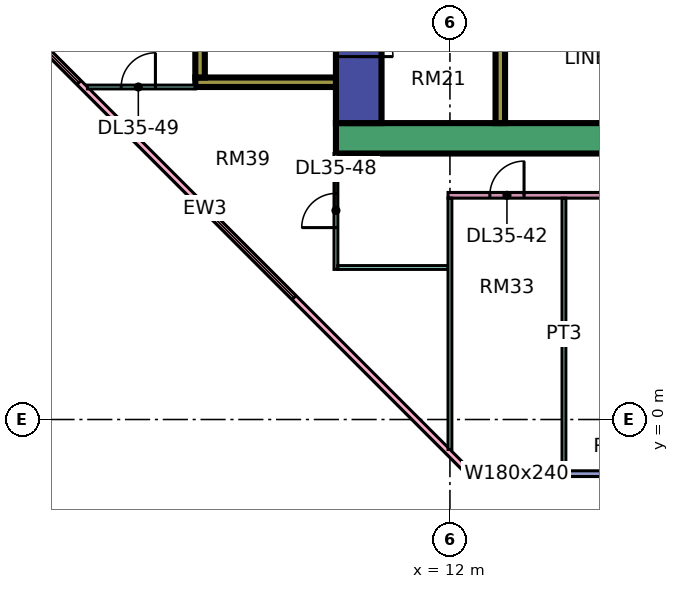
"""IFC4 building model, lengths in metres.
Left out: names, types, materials, properties, quantities, classifications, styles, units other than length and angle.
Written with IfcOpenShell. Run it as: python <this file> out.ifc"""

import sys

from ifc_helpers import new_model, si_unit, direction, frame, frame_2d, origin, place, context, subcontext, project, spatial, rectangle, extrude, element, fill, save


model = new_model("IFC4")
c1 = context("Model", 3, precision=1e-05, world=origin(), true_north=direction((0.0, 1.0)))
c2 = subcontext(c1, "Body", "Model", "MODEL_VIEW")
j1 = project(units=[si_unit("LENGTHUNIT", "METRE"), si_unit("PLANEANGLEUNIT", "RADIAN")], contexts=[c1])
p1 = place(None, origin())
s1 = spatial("IfcSite", under=j1, at=p1, CompositionType="ELEMENT")
p2 = place(p1, origin())
s2 = spatial("IfcBuilding", under=s1, at=p2, CompositionType="ELEMENT")
p3 = place(p2, frame((0.0, 0.0, 157.4)))
s3 = spatial("IfcBuildingStorey", under=s2, at=p3, CompositionType="ELEMENT", Elevation=157.4)
p4 = place(p3, frame((9.0, 7.4, 0.0), z_axis=(0.0, 0.0, 1.0), x_axis=(1.0, 0.0, 0.0)))
e1 = element("IfcWall", 1, at=p4, inside=s3, PredefinedType="SHEAR", context=c2, shape_type="SweptSolid", body=[
    extrude(rectangle(XDim=25.0, YDim=0.8, at=frame_2d((12.5, 0.0))), origin(), (0.0, 0.0, 1.0), 3.75),
])
p5 = place(p3, frame((9.6, 7.8, 0.0), z_axis=(0.0, 0.0, 1.0), x_axis=(0.0, 1.0, 0.0)))
e2 = element("IfcWall", 2, at=p5, inside=s3, PredefinedType="SHEAR", context=c2, shape_type="SweptSolid", body=[
    extrude(rectangle(XDim=11.4, YDim=1.2, at=frame_2d((5.7, 0.0))), origin(), (0.0, 0.0, 1.0), 3.75),
])
p6 = place(p5, frame((4.075, 0.0, 0.0)))
e3 = element("IfcOpeningElement", 3, at=p6, cuts=e2, PredefinedType="OPENING", context=c2, shape_type="SweptSolid", body=[
    extrude(rectangle(XDim=1.1, YDim=2.2, at=frame_2d((0.55, 1.1))), frame((0.0, 0.61, 0.0), z_axis=(0.0, -1.0, 0.0), x_axis=(1.0, 0.0, 0.0)), (0.0, 0.0, 1.0), 1.22),
])
p7 = place(p5, frame((6.575, 0.0, 0.0)))
e4 = element("IfcOpeningElement", 4, at=p7, cuts=e2, PredefinedType="OPENING", context=c2, shape_type="SweptSolid", body=[
    extrude(rectangle(XDim=1.1, YDim=2.2, at=frame_2d((0.55, 1.1))), frame((0.0, 0.61, 0.0), z_axis=(0.0, -1.0, 0.0), x_axis=(1.0, 0.0, 0.0)), (0.0, 0.0, 1.0), 1.22),
])
p8 = place(p5, frame((9.4, 0.0, 0.0)))
e5 = element("IfcOpeningElement", 5, at=p8, cuts=e2, PredefinedType="OPENING", context=c2, shape_type="SweptSolid", body=[
    extrude(rectangle(XDim=1.1, YDim=2.2, at=frame_2d((0.55, 1.1))), frame((0.0, 0.61, 0.0), z_axis=(0.0, -1.0, 0.0), x_axis=(1.0, 0.0, 0.0)), (0.0, 0.0, 1.0), 1.22),
])
p9 = place(p5, frame((1.75, 0.0, 0.0)))
e6 = element("IfcOpeningElement", 6, at=p9, cuts=e2, PredefinedType="OPENING", context=c2, shape_type="SweptSolid", body=[
    extrude(rectangle(XDim=0.9, YDim=2.1, at=frame_2d((0.45, 1.05))), frame((0.0, 0.61, 0.0), z_axis=(0.0, -1.0, 0.0), x_axis=(1.0, 0.0, 0.0)), (0.0, 0.0, 1.0), 1.22),
])
p10 = place(p3, frame((13.325, 7.8, 0.0), z_axis=(0.0, 0.0, 1.0), x_axis=(0.0, 1.0, 0.0)))
e7 = element("IfcWall", 7, at=p10, inside=s3, PredefinedType="SHEAR", context=c2, shape_type="SweptSolid", body=[
    extrude(rectangle(XDim=11.4, YDim=0.25, at=frame_2d((5.7, 0.0))), origin(), (0.0, 0.0, 1.0), 3.75),
])
p11 = place(p3, frame((5.3, 8.875, 0.0), z_axis=(0.0, 0.0, 1.0), x_axis=(1.0, 0.0, 0.0)))
e8 = element("IfcWall", 8, at=p11, inside=s3, PredefinedType="SHEAR", context=c2, shape_type="SweptSolid", body=[
    extrude(rectangle(XDim=3.7, YDim=0.25, at=frame_2d((1.85, 0.0))), origin(), (0.0, 0.0, 1.0), 3.75),
])
p12 = place(p3, frame((5.425, 9.0, 0.0), z_axis=(0.0, 0.0, 1.0), x_axis=(0.0, 1.0, 0.0)))
e9 = element("IfcWall", 9, at=p12, inside=s3, PredefinedType="SHEAR", context=c2, shape_type="SweptSolid", body=[
    extrude(rectangle(XDim=4.0, YDim=0.25, at=frame_2d((2.0, 0.0))), origin(), (0.0, 0.0, 1.0), 3.75),
])
p13 = place(p3, frame((-1.447, 12.553, 0.0), z_axis=(0.0, 0.0, 1.0), x_axis=(0.707106781187, -0.707106781187, 0.0)))
e10 = element("IfcWall", 10, at=p13, inside=s3, PredefinedType="SOLIDWALL", context=c2, shape_type="SweptSolid", body=[
    extrude(rectangle(XDim=19.799, YDim=0.15, at=frame_2d((9.899, 0.0))), origin(), (0.0, 0.0, 1.0), 3.35),
])
p14 = place(p13, frame((2.212, 0.0, 0.45)))
e11 = element("IfcOpeningElement", 11, at=p14, cuts=e10, PredefinedType="OPENING", context=c2, shape_type="SweptSolid", body=[
    extrude(rectangle(XDim=3.0, YDim=2.4, at=frame_2d((1.5, 1.2))), frame((0.0, 0.085, 0.0), z_axis=(0.0, -1.0, 0.0), x_axis=(1.0, 0.0, 0.0)), (0.0, 0.0, 1.0), 0.17),
])
p15 = place(p13, frame((10.216, 0.0, 0.45)))
e12 = element("IfcOpeningElement", 12, at=p15, cuts=e10, PredefinedType="OPENING", context=c2, shape_type="SweptSolid", body=[
    extrude(rectangle(XDim=3.0, YDim=2.4, at=frame_2d((1.5, 1.2))), frame((0.0, 0.085, 0.0), z_axis=(0.0, -1.0, 0.0), x_axis=(1.0, 0.0, 0.0)), (0.0, 0.0, 1.0), 0.17),
])
p16 = place(p3, frame((12.5, -1.425, 0.0), z_axis=(0.0, 0.0, 1.0), x_axis=(1.0, 0.0, 0.0)))
e13 = element("IfcWall", 13, at=p16, inside=s3, PredefinedType="SOLIDWALL", context=c2, shape_type="SweptSolid", body=[
    extrude(rectangle(XDim=11.425, YDim=0.15, at=frame_2d((5.712, 0.0))), origin(), (0.0, 0.0, 1.0), 3.35),
])
p17 = place(p16, frame((0.35, 0.0, 0.45)))
e14 = element("IfcOpeningElement", 14, at=p17, cuts=e13, PredefinedType="OPENING", context=c2, shape_type="SweptSolid", body=[
    extrude(rectangle(XDim=1.8, YDim=2.4, at=frame_2d((0.9, 1.2))), frame((0.0, 0.085, 0.0), z_axis=(0.0, -1.0, 0.0), x_axis=(1.0, 0.0, 0.0)), (0.0, 0.0, 1.0), 0.17),
])
p18 = place(p16, frame((5.462, 0.0, 0.45)))
e15 = element("IfcOpeningElement", 15, at=p18, cuts=e13, PredefinedType="OPENING", context=c2, shape_type="SweptSolid", body=[
    extrude(rectangle(XDim=3.0, YDim=2.4, at=frame_2d((1.5, 1.2))), frame((0.0, 0.085, 0.0), z_axis=(0.0, -1.0, 0.0), x_axis=(1.0, 0.0, 0.0)), (0.0, 0.0, 1.0), 0.17),
])
p19 = place(p3, frame((2.461, 8.75, 0.0), z_axis=(0.0, 0.0, 1.0), x_axis=(1.0, 0.0, 0.0)))
e16 = element("IfcWall", 16, at=p19, inside=s3, PredefinedType="PARTITIONING", context=c2, shape_type="SweptSolid", body=[
    extrude(rectangle(XDim=2.839, YDim=0.1, at=frame_2d((1.419, 0.0))), origin(), (0.0, 0.0, 1.0), 3.35),
])
p20 = place(p19, frame((0.889, 0.0, 0.0)))
e17 = element("IfcOpeningElement", 17, at=p20, cuts=e16, PredefinedType="OPENING", context=c2, shape_type="SweptSolid", body=[
    extrude(rectangle(XDim=0.9, YDim=2.1, at=frame_2d((0.45, 1.05))), frame((0.0, 0.06, 0.0), z_axis=(0.0, -1.0, 0.0), x_axis=(1.0, 0.0, 0.0)), (0.0, 0.0, 1.0), 0.12),
])
p21 = place(p3, frame((9.0, 3.95, 0.0), z_axis=(0.0, 0.0, 1.0), x_axis=(0.0, 1.0, 0.0)))
e18 = element("IfcWall", 18, at=p21, inside=s3, PredefinedType="PARTITIONING", context=c2, shape_type="SweptSolid", body=[
    extrude(rectangle(XDim=3.05, YDim=0.1, at=frame_2d((1.525, 0.0))), origin(), (0.0, 0.0, 1.0), 3.35),
])
p22 = place(p21, frame((1.1, 0.0, 0.0)))
e19 = element("IfcOpeningElement", 19, at=p22, cuts=e18, PredefinedType="OPENING", context=c2, shape_type="SweptSolid", body=[
    extrude(rectangle(XDim=0.9, YDim=2.1, at=frame_2d((0.45, 1.05))), frame((0.0, 0.06, 0.0), z_axis=(0.0, -1.0, 0.0), x_axis=(1.0, 0.0, 0.0)), (0.0, 0.0, 1.0), 0.12),
])
p23 = place(p3, frame((9.05, 4.0, 0.0), z_axis=(0.0, 0.0, 1.0), x_axis=(1.0, 0.0, 0.0)))
e20 = element("IfcWall", 20, at=p23, inside=s3, PredefinedType="PARTITIONING", context=c2, shape_type="SweptSolid", body=[
    extrude(rectangle(XDim=2.9, YDim=0.1, at=frame_2d((1.45, 0.0))), origin(), (0.0, 0.0, 1.0), 3.35),
])
p24 = place(p3, frame((11.95, 5.9, 0.0), z_axis=(0.0, 0.0, 1.0), x_axis=(1.0, 0.0, 0.0)))
e21 = element("IfcWall", 21, at=p24, inside=s3, PredefinedType="PARTITIONING", context=c2, shape_type="SweptSolid", body=[
    extrude(rectangle(XDim=21.1, YDim=0.15, at=frame_2d((10.55, 0.0))), origin(), (0.0, 0.0, 1.0), 3.35),
])
p25 = place(p24, frame((1.1, 0.0, 0.0)))
e22 = element("IfcOpeningElement", 22, at=p25, cuts=e21, PredefinedType="OPENING", context=c2, shape_type="SweptSolid", body=[
    extrude(rectangle(XDim=0.9, YDim=2.1, at=frame_2d((0.45, 1.05))), frame((0.0, 0.085, 0.0), z_axis=(0.0, -1.0, 0.0), x_axis=(1.0, 0.0, 0.0)), (0.0, 0.0, 1.0), 0.17),
])
p26 = place(p24, frame((16.1, 0.0, 0.0)))
e23 = element("IfcOpeningElement", 23, at=p26, cuts=e21, PredefinedType="OPENING", context=c2, shape_type="SweptSolid", body=[
    extrude(rectangle(XDim=0.9, YDim=2.1, at=frame_2d((0.45, 1.05))), frame((0.0, 0.085, 0.0), z_axis=(0.0, -1.0, 0.0), x_axis=(1.0, 0.0, 0.0)), (0.0, 0.0, 1.0), 0.17),
])
p27 = place(p24, frame((7.1, 0.0, 0.0)))
e24 = element("IfcOpeningElement", 24, at=p27, cuts=e21, PredefinedType="OPENING", context=c2, shape_type="SweptSolid", body=[
    extrude(rectangle(XDim=0.9, YDim=2.1, at=frame_2d((0.45, 1.05))), frame((0.0, 0.085, 0.0), z_axis=(0.0, -1.0, 0.0), x_axis=(1.0, 0.0, 0.0)), (0.0, 0.0, 1.0), 0.17),
])
p28 = place(p3, frame((12.0, -0.788, 0.0), z_axis=(0.0, 0.0, 1.0), x_axis=(0.0, 1.0, 0.0)))
e25 = element("IfcWall", 25, at=p28, inside=s3, PredefinedType="PARTITIONING", context=c2, shape_type="SweptSolid", body=[
    extrude(rectangle(XDim=6.613, YDim=0.1, at=frame_2d((3.306, 0.0))), origin(), (0.0, 0.0, 1.0), 3.35),
])
p29 = place(p3, frame((15.0, -1.35, 0.0), z_axis=(0.0, 0.0, 1.0), x_axis=(0.0, 1.0, 0.0)))
e26 = element("IfcWall", 26, at=p29, inside=s3, PredefinedType="PARTITIONING", context=c2, shape_type="SweptSolid", body=[
    extrude(rectangle(XDim=7.175, YDim=0.1, at=frame_2d((3.587, 0.0))), origin(), (0.0, 0.0, 1.0), 3.35),
])
p30 = place(p14, origin())
e27 = element("IfcWindow", 27, at=p30, inside=s3, PartitioningType="SINGLE_PANEL", PredefinedType="WINDOW", context=c2, shape_type="SweptSolid", body=[
    extrude(rectangle(XDim=3.0, YDim=2.4, at=frame_2d((1.5, 1.2))), frame((0.0, 0.03, 0.0), z_axis=(0.0, -1.0, 0.0), x_axis=(1.0, 0.0, 0.0)), (0.0, 0.0, 1.0), 0.06),
])
fill(e11, e27)
p31 = place(p15, origin())
e28 = element("IfcWindow", 28, at=p31, inside=s3, PartitioningType="SINGLE_PANEL", PredefinedType="WINDOW", context=c2, shape_type="SweptSolid", body=[
    extrude(rectangle(XDim=3.0, YDim=2.4, at=frame_2d((1.5, 1.2))), frame((0.0, 0.03, 0.0), z_axis=(0.0, -1.0, 0.0), x_axis=(1.0, 0.0, 0.0)), (0.0, 0.0, 1.0), 0.06),
])
fill(e12, e28)
p32 = place(p17, origin())
e29 = element("IfcWindow", 29, at=p32, inside=s3, PartitioningType="SINGLE_PANEL", PredefinedType="WINDOW", context=c2, shape_type="SweptSolid", body=[
    extrude(rectangle(XDim=1.8, YDim=2.4, at=frame_2d((0.9, 1.2))), frame((0.0, 0.03, 0.0), z_axis=(0.0, -1.0, 0.0), x_axis=(1.0, 0.0, 0.0)), (0.0, 0.0, 1.0), 0.06),
])
fill(e14, e29)
p33 = place(p9, frame((0.9, 0.0, 0.0), z_axis=(0.0, 0.0, 1.0), x_axis=(-1.0, 0.0, 0.0)))
e30 = element("IfcDoor", 30, at=p33, inside=s3, OperationType="SINGLE_SWING_LEFT", PredefinedType="DOOR", context=c2, shape_type="SweptSolid", body=[
    extrude(rectangle(XDim=0.9, YDim=2.1, at=frame_2d((0.45, 1.05))), frame((0.0, 0.025, 0.0), z_axis=(0.0, -1.0, 0.0), x_axis=(1.0, 0.0, 0.0)), (0.0, 0.0, 1.0), 0.05),
])
fill(e6, e30)
p34 = place(p25, frame((0.9, 0.0, 0.0), z_axis=(0.0, 0.0, 1.0), x_axis=(-1.0, 0.0, 0.0)))
e31 = element("IfcDoor", 31, at=p34, inside=s3, OperationType="SINGLE_SWING_RIGHT", PredefinedType="DOOR", context=c2, shape_type="SweptSolid", body=[
    extrude(rectangle(XDim=0.9, YDim=2.1, at=frame_2d((0.45, 1.05))), frame((0.0, 0.025, 0.0), z_axis=(0.0, -1.0, 0.0), x_axis=(1.0, 0.0, 0.0)), (0.0, 0.0, 1.0), 0.05),
])
fill(e22, e31)
p35 = place(p22, origin())
e32 = element("IfcDoor", 32, at=p35, inside=s3, OperationType="SINGLE_SWING_LEFT", PredefinedType="DOOR", context=c2, shape_type="SweptSolid", body=[
    extrude(rectangle(XDim=0.9, YDim=2.1, at=frame_2d((0.45, 1.05))), frame((0.0, 0.025, 0.0), z_axis=(0.0, -1.0, 0.0), x_axis=(1.0, 0.0, 0.0)), (0.0, 0.0, 1.0), 0.05),
])
fill(e19, e32)
p36 = place(p20, frame((0.9, 0.0, 0.0), z_axis=(0.0, 0.0, 1.0), x_axis=(-1.0, 0.0, 0.0)))
e33 = element("IfcDoor", 33, at=p36, inside=s3, OperationType="SINGLE_SWING_RIGHT", PredefinedType="DOOR", context=c2, shape_type="SweptSolid", body=[
    extrude(rectangle(XDim=0.9, YDim=2.1, at=frame_2d((0.45, 1.05))), frame((0.0, 0.025, 0.0), z_axis=(0.0, -1.0, 0.0), x_axis=(1.0, 0.0, 0.0)), (0.0, 0.0, 1.0), 0.05),
])
fill(e17, e33)
save(model, sys.argv[1])
